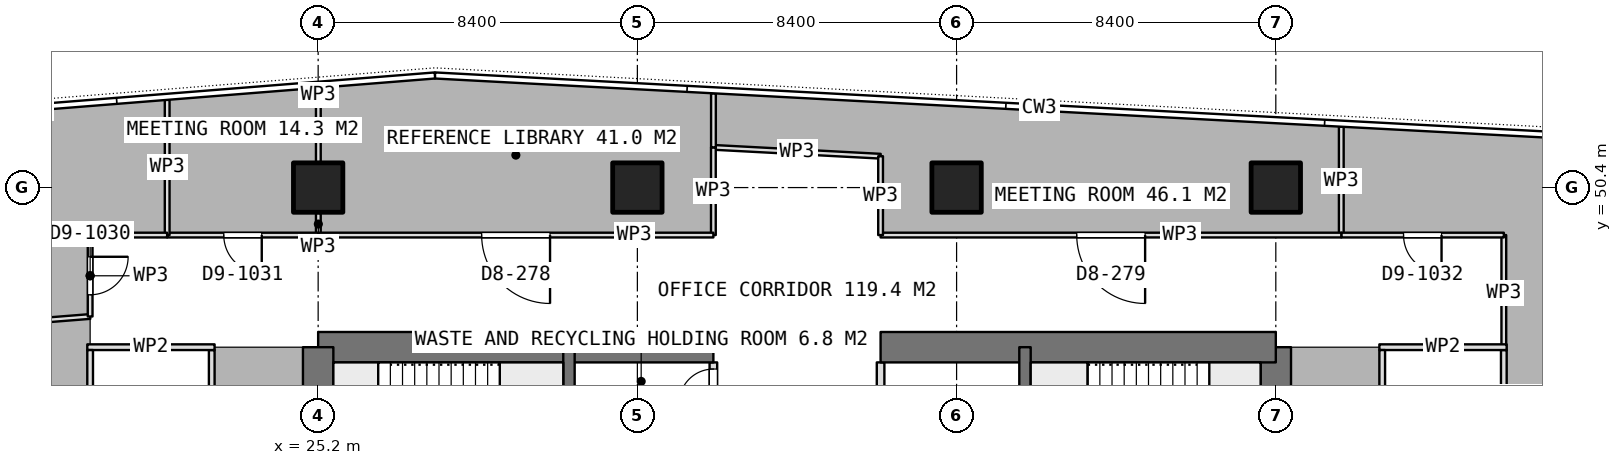
"""IFC4 building model, lengths in metres.
Left out: names, types, materials, properties, quantities, classifications, styles, units other than length and angle.
Written with IfcOpenShell. Run it as: python <this file> out.ifc"""

import sys

from ifc_helpers import new_model, si_unit, direction, frame, frame_2d, origin, origin_2d, place, context, subcontext, project, spatial, rectangle, extrude, element, fill, save


model = new_model("IFC4")
c1 = context("Model", 3, precision=1e-05, world=origin(), true_north=direction((0.0, 1.0)))
c2 = subcontext(c1, "Body", "Model", "MODEL_VIEW")
j1 = project(units=[si_unit("LENGTHUNIT", "METRE"), si_unit("PLANEANGLEUNIT", "RADIAN")], contexts=[c1])
p1 = place(None, origin())
s1 = spatial("IfcSite", under=j1, at=p1, CompositionType="ELEMENT")
p2 = place(p1, origin())
s2 = spatial("IfcBuilding", under=s1, at=p2, CompositionType="ELEMENT")
p3 = place(p2, frame((0.0, 0.0, 276.35)))
s3 = spatial("IfcBuildingStorey", under=s2, at=p3, CompositionType="ELEMENT", Elevation=276.35)
p4 = place(p3, frame((25.2, 46.2, 0.0), z_axis=(0.0, 0.0, 1.0), x_axis=(1.0, 0.0, 0.0)))
e1 = element("IfcWall", 1, at=p4, inside=s3, PredefinedType="SHEAR", context=c2, shape_type="SweptSolid", body=[
    extrude(rectangle(XDim=10.4, YDim=0.8, at=frame_2d((5.2, 0.0))), origin(), (0.0, 0.0, 1.0), 3.75),
])
p5 = place(p3, frame((40.0, 46.2, 0.0), z_axis=(0.0, 0.0, 1.0), x_axis=(1.0, 0.0, 0.0)))
e2 = element("IfcWall", 2, at=p5, inside=s3, PredefinedType="SHEAR", context=c2, shape_type="SweptSolid", body=[
    extrude(rectangle(XDim=10.4, YDim=0.8, at=frame_2d((5.2, 0.0))), origin(), (0.0, 0.0, 1.0), 3.75),
])
p6 = place(p3, frame((25.2, 21.0, 0.0), z_axis=(0.0, 0.0, 1.0), x_axis=(0.0, 1.0, 0.0)))
e3 = element("IfcWall", 3, at=p6, inside=s3, PredefinedType="SHEAR", context=c2, shape_type="SweptSolid", body=[
    extrude(rectangle(XDim=25.2, YDim=0.8, at=frame_2d((12.6, 0.0))), origin(), (0.0, 0.0, 1.0), 3.75),
])
p7 = place(p6, frame((7.8, 0.0, 0.0)))
e4 = element("IfcOpeningElement", 4, at=p7, cuts=e3, PredefinedType="OPENING", context=c2, shape_type="SweptSolid", body=[
    extrude(rectangle(XDim=1.2, YDim=2.1, at=frame_2d((0.6, 1.05))), frame((0.0, 0.41, 0.0), z_axis=(0.0, -1.0, 0.0), x_axis=(1.0, 0.0, 0.0)), (0.0, 0.0, 1.0), 0.82),
])
p8 = place(p6, frame((14.25, 0.0, 0.0)))
e5 = element("IfcOpeningElement", 5, at=p8, cuts=e3, PredefinedType="OPENING", context=c2, shape_type="SweptSolid", body=[
    extrude(rectangle(XDim=0.9, YDim=2.1, at=frame_2d((0.45, 1.05))), frame((0.0, 0.41, 0.0), z_axis=(0.0, -1.0, 0.0), x_axis=(1.0, 0.0, 0.0)), (0.0, 0.0, 1.0), 0.82),
])
p9 = place(p6, frame((16.85, 0.0, 0.0)))
e6 = element("IfcOpeningElement", 6, at=p9, cuts=e3, PredefinedType="OPENING", context=c2, shape_type="SweptSolid", body=[
    extrude(rectangle(XDim=0.9, YDim=2.1, at=frame_2d((0.45, 1.05))), frame((0.0, 0.41, 0.0), z_axis=(0.0, -1.0, 0.0), x_axis=(1.0, 0.0, 0.0)), (0.0, 0.0, 1.0), 0.82),
])
p10 = place(p6, frame((18.95, 0.0, 0.0)))
e7 = element("IfcOpeningElement", 7, at=p10, cuts=e3, PredefinedType="OPENING", context=c2, shape_type="SweptSolid", body=[
    extrude(rectangle(XDim=1.2, YDim=2.1, at=frame_2d((0.6, 1.05))), frame((0.0, 0.41, 0.0), z_axis=(0.0, -1.0, 0.0), x_axis=(1.0, 0.0, 0.0)), (0.0, 0.0, 1.0), 0.82),
])
p11 = place(p3, frame((50.4, 21.0, 0.0), z_axis=(0.0, 0.0, 1.0), x_axis=(0.0, 1.0, 0.0)))
e8 = element("IfcWall", 8, at=p11, inside=s3, PredefinedType="SHEAR", context=c2, shape_type="SweptSolid", body=[
    extrude(rectangle(XDim=25.2, YDim=0.8, at=frame_2d((12.6, 0.0))), origin(), (0.0, 0.0, 1.0), 3.75),
])
p12 = place(p11, frame((16.2, 0.0, 0.0)))
e9 = element("IfcOpeningElement", 9, at=p12, cuts=e8, PredefinedType="OPENING", context=c2, shape_type="SweptSolid", body=[
    extrude(rectangle(XDim=1.2, YDim=2.1, at=frame_2d((0.6, 1.05))), frame((0.0, 0.41, 0.0), z_axis=(0.0, -1.0, 0.0), x_axis=(1.0, 0.0, 0.0)), (0.0, 0.0, 1.0), 0.82),
])
p13 = place(p11, frame((10.05, 0.0, 0.0)))
e10 = element("IfcOpeningElement", 10, at=p13, cuts=e8, PredefinedType="OPENING", context=c2, shape_type="SweptSolid", body=[
    extrude(rectangle(XDim=0.9, YDim=2.1, at=frame_2d((0.45, 1.05))), frame((0.0, 0.41, 0.0), z_axis=(0.0, -1.0, 0.0), x_axis=(1.0, 0.0, 0.0)), (0.0, 0.0, 1.0), 0.82),
])
p14 = place(p11, frame((7.45, 0.0, 0.0)))
e11 = element("IfcOpeningElement", 11, at=p14, cuts=e8, PredefinedType="OPENING", context=c2, shape_type="SweptSolid", body=[
    extrude(rectangle(XDim=0.9, YDim=2.1, at=frame_2d((0.45, 1.05))), frame((0.0, 0.41, 0.0), z_axis=(0.0, -1.0, 0.0), x_axis=(1.0, 0.0, 0.0)), (0.0, 0.0, 1.0), 0.82),
])
p15 = place(p11, frame((0.6, 0.0, 0.0)))
e12 = element("IfcOpeningElement", 12, at=p15, cuts=e8, PredefinedType="OPENING", context=c2, shape_type="SweptSolid", body=[
    extrude(rectangle(XDim=1.2, YDim=2.1, at=frame_2d((0.6, 1.05))), frame((0.0, 0.41, 0.0), z_axis=(0.0, -1.0, 0.0), x_axis=(1.0, 0.0, 0.0)), (0.0, 0.0, 1.0), 0.82),
])
for number, where, z_axis, x_axis in (
    (13, (31.8, 21.0, 0.0), (0.0, 0.0, 1.0), (0.0, 1.0, 0.0)),
    (14, (43.8, 21.0, 0.0), (0.0, 0.0, 1.0), (0.0, 1.0, 0.0)),
):
    element("IfcWall", number, at=place(p3, frame(where, z_axis=z_axis, x_axis=x_axis)), inside=s3, PredefinedType="SHEAR", context=c2, shape_type="SweptSolid", body=[
        extrude(rectangle(XDim=25.2, YDim=0.3, at=frame_2d((12.6, 0.0))), origin(), (0.0, 0.0, 1.0), 3.75),
    ])
for number, where, z_axis, x_axis in (
    (15, (25.2, 50.4, 0.0), (0.0, 0.0, 1.0), (1.0, 0.0, 0.0)),
    (16, (33.6, 50.4, 0.0), (0.0, 0.0, 1.0), (1.0, 0.0, 0.0)),
    (17, (42.0, 50.4, 0.0), (0.0, 0.0, 1.0), (1.0, 0.0, 0.0)),
    (18, (50.4, 50.4, 0.0), (0.0, 0.0, 1.0), (1.0, 0.0, 0.0)),
):
    element("IfcColumn", number, at=place(p3, frame(where, z_axis=z_axis, x_axis=x_axis)), inside=s3, PredefinedType="COLUMN", context=c2, shape_type="SweptSolid", body=[
        extrude(rectangle(XDim=1.3, YDim=1.3, at=origin_2d()), origin(), (0.0, 0.0, 1.0), 3.75),
    ])
p16 = place(p3, frame((40.0, 41.55, 0.0), z_axis=(0.0, 0.0, 1.0), x_axis=(0.0, 1.0, 0.0)))
e19 = element("IfcWall", 19, at=p16, inside=s3, PredefinedType="PARTITIONING", context=c2, shape_type="SweptSolid", body=[
    extrude(rectangle(XDim=4.25, YDim=0.2, at=frame_2d((2.125, 0.0))), origin(), (0.0, 0.0, 1.0), 3.5),
])
p17 = place(p16, frame((1.8, 0.0, 0.0)))
e20 = element("IfcOpeningElement", 20, at=p17, cuts=e19, PredefinedType="OPENING", context=c2, shape_type="SweptSolid", body=[
    extrude(rectangle(XDim=0.9, YDim=2.1, at=frame_2d((0.45, 1.05))), frame((0.0, 0.11, 0.0), z_axis=(0.0, -1.0, 0.0), x_axis=(1.0, 0.0, 0.0)), (0.0, 0.0, 1.0), 0.22),
])
p18 = place(p3, frame((35.6, 41.55, 0.0), z_axis=(0.0, 0.0, 1.0), x_axis=(0.0, 1.0, 0.0)))
e21 = element("IfcWall", 21, at=p18, inside=s3, PredefinedType="PARTITIONING", context=c2, shape_type="SweptSolid", body=[
    extrude(rectangle(XDim=4.25, YDim=0.2, at=frame_2d((2.125, 0.0))), origin(), (0.0, 0.0, 1.0), 3.5),
])
p19 = place(p18, frame((3.175, 0.0, 0.0)))
e22 = element("IfcOpeningElement", 22, at=p19, cuts=e21, PredefinedType="OPENING", context=c2, shape_type="SweptSolid", body=[
    extrude(rectangle(XDim=0.9, YDim=2.1, at=frame_2d((0.45, 1.05))), frame((0.0, 0.11, 0.0), z_axis=(0.0, -1.0, 0.0), x_axis=(1.0, 0.0, 0.0)), (0.0, 0.0, 1.0), 0.22),
])
p20 = place(p18, frame((0.8, 0.0, 0.0)))
e23 = element("IfcOpeningElement", 23, at=p20, cuts=e21, PredefinedType="OPENING", context=c2, shape_type="SweptSolid", body=[
    extrude(rectangle(XDim=1.1, YDim=2.1, at=frame_2d((0.55, 1.05))), frame((0.0, 0.11, 0.0), z_axis=(0.0, -1.0, 0.0), x_axis=(1.0, 0.0, 0.0)), (0.0, 0.0, 1.0), 0.22),
])
p21 = place(p3, frame((53.125, 46.2, 0.0), z_axis=(0.0, 0.0, 1.0), x_axis=(1.0, 0.0, 0.0)))
e24 = element("IfcWall", 24, at=p21, inside=s3, PredefinedType="PARTITIONING", context=c2, shape_type="SweptSolid", body=[
    extrude(rectangle(XDim=3.35, YDim=0.15, at=frame_2d((1.675, 0.0))), origin(), (0.0, 0.0, 1.0), 3.5),
])
p22 = place(p3, frame((53.2, 39.275, 0.0), z_axis=(0.0, 0.0, 1.0), x_axis=(0.0, 1.0, 0.0)))
e25 = element("IfcWall", 25, at=p22, inside=s3, PredefinedType="PARTITIONING", context=c2, shape_type="SweptSolid", body=[
    extrude(rectangle(XDim=6.85, YDim=0.15, at=frame_2d((3.425, 0.0))), origin(), (0.0, 0.0, 1.0), 3.5),
])
p23 = place(p22, frame((2.925, 0.0, 0.0)))
e26 = element("IfcOpeningElement", 26, at=p23, cuts=e25, PredefinedType="OPENING", context=c2, shape_type="SweptSolid", body=[
    extrude(rectangle(XDim=1.0, YDim=2.1, at=frame_2d((0.5, 1.05))), frame((0.0, 0.085, 0.0), z_axis=(0.0, -1.0, 0.0), x_axis=(1.0, 0.0, 0.0)), (0.0, 0.0, 1.0), 0.17),
])
p24 = place(p3, frame((56.4, 39.275, 0.0), z_axis=(0.0, 0.0, 1.0), x_axis=(0.0, 1.0, 0.0)))
e27 = element("IfcWall", 27, at=p24, inside=s3, PredefinedType="PARTITIONING", context=c2, shape_type="SweptSolid", body=[
    extrude(rectangle(XDim=6.85, YDim=0.15, at=frame_2d((3.425, 0.0))), origin(), (0.0, 0.0, 1.0), 3.5),
])
p25 = place(p3, frame((19.125, 46.2, 0.0), z_axis=(0.0, 0.0, 1.0), x_axis=(1.0, 0.0, 0.0)))
e28 = element("IfcWall", 28, at=p25, inside=s3, PredefinedType="PARTITIONING", context=c2, shape_type="SweptSolid", body=[
    extrude(rectangle(XDim=3.35, YDim=0.15, at=frame_2d((1.675, 0.0))), origin(), (0.0, 0.0, 1.0), 3.5),
])
p26 = place(p3, frame((19.2, 39.275, 0.0), z_axis=(0.0, 0.0, 1.0), x_axis=(0.0, 1.0, 0.0)))
e29 = element("IfcWall", 29, at=p26, inside=s3, PredefinedType="PARTITIONING", context=c2, shape_type="SweptSolid", body=[
    extrude(rectangle(XDim=6.85, YDim=0.15, at=frame_2d((3.425, 0.0))), origin(), (0.0, 0.0, 1.0), 3.5),
])
p27 = place(p3, frame((22.4, 39.275, 0.0), z_axis=(0.0, 0.0, 1.0), x_axis=(0.0, 1.0, 0.0)))
e30 = element("IfcWall", 30, at=p27, inside=s3, PredefinedType="PARTITIONING", context=c2, shape_type="SweptSolid", body=[
    extrude(rectangle(XDim=6.85, YDim=0.15, at=frame_2d((3.425, 0.0))), origin(), (0.0, 0.0, 1.0), 3.5),
])
p28 = place(p27, frame((2.925, 0.0, 0.0)))
e31 = element("IfcOpeningElement", 31, at=p28, cuts=e30, PredefinedType="OPENING", context=c2, shape_type="SweptSolid", body=[
    extrude(rectangle(XDim=1.0, YDim=2.1, at=frame_2d((0.5, 1.05))), frame((0.0, 0.085, 0.0), z_axis=(0.0, -1.0, 0.0), x_axis=(1.0, 0.0, 0.0)), (0.0, 0.0, 1.0), 0.17),
])
p29 = place(p3, frame((52.123, 49.15, 0.0), z_axis=(0.0, 0.0, 1.0), x_axis=(0.0, 1.0, 0.0)))
e32 = element("IfcWall", 32, at=p29, inside=s3, PredefinedType="PARTITIONING", context=c2, shape_type="SweptSolid", body=[
    extrude(rectangle(XDim=2.852, YDim=0.125, at=frame_2d((1.426, 0.0))), origin(), (0.0, 0.0, 1.0), 3.5),
])
p30 = place(p3, frame((56.4, 46.125, 0.0), z_axis=(0.0, 0.0, 1.0), x_axis=(0.0, 1.0, 0.0)))
e33 = element("IfcWall", 33, at=p30, inside=s3, PredefinedType="PARTITIONING", context=c2, shape_type="SweptSolid", body=[
    extrude(rectangle(XDim=3.025, YDim=0.125, at=frame_2d((1.512, 0.0))), origin(), (0.0, 0.0, 1.0), 3.5),
])
p31 = place(p3, frame((56.4, 49.15, 0.0), z_axis=(0.0, 0.0, 1.0), x_axis=(-1.0, 0.0, 0.0)))
e34 = element("IfcWall", 34, at=p31, inside=s3, PredefinedType="PARTITIONING", context=c2, shape_type="SweptSolid", body=[
    extrude(rectangle(XDim=4.277, YDim=0.125, at=frame_2d((2.138, 0.0))), origin(), (0.0, 0.0, 1.0), 3.5),
])
p32 = place(p31, frame((1.639, 0.0, 0.0)))
e35 = element("IfcOpeningElement", 35, at=p32, cuts=e34, PredefinedType="OPENING", context=c2, shape_type="SweptSolid", body=[
    extrude(rectangle(XDim=1.0, YDim=2.1, at=frame_2d((0.5, 1.05))), frame((0.0, 0.073, 0.0), z_axis=(0.0, -1.0, 0.0), x_axis=(1.0, 0.0, 0.0)), (0.0, 0.0, 1.0), 0.145),
])
p33 = place(p3, frame((35.602, 51.458, 0.0), z_axis=(0.0, 0.0, 1.0), x_axis=(0.0, 1.0, 0.0)))
e36 = element("IfcWall", 36, at=p33, inside=s3, PredefinedType="PARTITIONING", context=c2, shape_type="SweptSolid", body=[
    extrude(rectangle(XDim=1.422, YDim=0.125, at=frame_2d((0.711, 0.0))), origin(), (0.0, 0.0, 1.0), 3.5),
])
p34 = place(p3, frame((52.123, 49.15, 0.0), z_axis=(0.0, 0.0, 1.0), x_axis=(-1.0, 0.0, 0.0)))
e37 = element("IfcWall", 37, at=p34, inside=s3, PredefinedType="PARTITIONING", context=c2, shape_type="SweptSolid", body=[
    extrude(rectangle(XDim=12.123, YDim=0.125, at=frame_2d((6.062, 0.0))), origin(), (0.0, 0.0, 1.0), 3.5),
])
p35 = place(p34, frame((5.162, 0.0, 0.0)))
e38 = element("IfcOpeningElement", 38, at=p35, cuts=e37, PredefinedType="OPENING", context=c2, shape_type="SweptSolid", body=[
    extrude(rectangle(XDim=1.8, YDim=2.1, at=frame_2d((0.9, 1.05))), frame((0.0, 0.073, 0.0), z_axis=(0.0, -1.0, 0.0), x_axis=(1.0, 0.0, 0.0)), (0.0, 0.0, 1.0), 0.145),
])
p36 = place(p3, frame((40.0, 49.15, 0.0), z_axis=(0.0, 0.0, 1.0), x_axis=(0.0, 1.0, 0.0)))
e39 = element("IfcWall", 39, at=p36, inside=s3, PredefinedType="PARTITIONING", context=c2, shape_type="SweptSolid", body=[
    extrude(rectangle(XDim=2.075, YDim=0.125, at=frame_2d((1.038, 0.0))), origin(), (0.0, 0.0, 1.0), 3.5),
])
p37 = place(p3, frame((40.0, 51.225, 0.0), z_axis=(0.0, 0.0, 1.0), x_axis=(-0.998600625097, 0.052884700585, 0.0)))
e40 = element("IfcWall", 40, at=p37, inside=s3, PredefinedType="PARTITIONING", context=c2, shape_type="SweptSolid", body=[
    extrude(rectangle(XDim=4.404, YDim=0.125, at=frame_2d((2.202, 0.0))), origin(), (0.0, 0.0, 1.0), 3.5),
])
p38 = place(p3, frame((25.205, 53.025, 0.0), z_axis=(0.0, 0.0, 1.0), x_axis=(0.0, -1.0, 0.0)))
e41 = element("IfcWall", 41, at=p38, inside=s3, PredefinedType="PARTITIONING", context=c2, shape_type="SweptSolid", body=[
    extrude(rectangle(XDim=1.955, YDim=0.125, at=frame_2d((0.978, 0.0))), origin(), (0.0, 0.0, 1.0), 3.5),
])
p39 = place(p3, frame((25.205, 49.73, 0.0), z_axis=(0.0, 0.0, 1.0), x_axis=(0.0, -1.0, 0.0)))
e42 = element("IfcWall", 42, at=p39, inside=s3, PredefinedType="PARTITIONING", context=c2, shape_type="SweptSolid", body=[
    extrude(rectangle(XDim=0.58, YDim=0.125, at=frame_2d((0.29, 0.0))), origin(), (0.0, 0.0, 1.0), 3.5),
])
p40 = place(p3, frame((25.205, 49.15, 0.0), z_axis=(0.0, 0.0, 1.0), x_axis=(-1.0, 0.0, 0.0)))
e43 = element("IfcWall", 43, at=p40, inside=s3, PredefinedType="PARTITIONING", context=c2, shape_type="SweptSolid", body=[
    extrude(rectangle(XDim=3.978, YDim=0.125, at=frame_2d((1.989, 0.0))), origin(), (0.0, 0.0, 1.0), 3.5),
])
p41 = place(p40, frame((1.489, 0.0, 0.0)))
e44 = element("IfcOpeningElement", 44, at=p41, cuts=e43, PredefinedType="OPENING", context=c2, shape_type="SweptSolid", body=[
    extrude(rectangle(XDim=1.0, YDim=2.1, at=frame_2d((0.5, 1.05))), frame((0.0, 0.073, 0.0), z_axis=(0.0, -1.0, 0.0), x_axis=(1.0, 0.0, 0.0)), (0.0, 0.0, 1.0), 0.145),
])
p42 = place(p3, frame((21.227, 49.15, 0.0), z_axis=(0.0, 0.0, 1.0), x_axis=(0.0, 1.0, 0.0)))
e45 = element("IfcWall", 45, at=p42, inside=s3, PredefinedType="PARTITIONING", context=c2, shape_type="SweptSolid", body=[
    extrude(rectangle(XDim=3.558, YDim=0.125, at=frame_2d((1.779, 0.0))), origin(), (0.0, 0.0, 1.0), 3.5),
])
p43 = place(p3, frame((19.2, 47.008, 0.0), z_axis=(0.0, 0.0, 1.0), x_axis=(-0.996842300725, -0.079406721921, 0.0)))
e46 = element("IfcWall", 46, at=p43, inside=s3, PredefinedType="PARTITIONING", context=c2, shape_type="SweptSolid", body=[
    extrude(rectangle(XDim=6.02, YDim=0.125, at=frame_2d((3.01, 0.0))), origin(), (0.0, 0.0, 1.0), 3.5),
])
p44 = place(p3, frame((21.226, 49.15, 0.0), z_axis=(0.0, 0.0, 1.0), x_axis=(-1.0, 0.0, 0.0)))
e47 = element("IfcWall", 47, at=p44, inside=s3, PredefinedType="PARTITIONING", context=c2, shape_type="SweptSolid", body=[
    extrude(rectangle(XDim=2.026, YDim=0.125, at=frame_2d((1.013, 0.0))), origin(), (0.0, 0.0, 1.0), 3.5),
])
p45 = place(p3, frame((19.2, 49.15, 0.0), z_axis=(0.0, 0.0, 1.0), x_axis=(0.0, -1.0, 0.0)))
e48 = element("IfcWall", 48, at=p45, inside=s3, PredefinedType="PARTITIONING", context=c2, shape_type="SweptSolid", body=[
    extrude(rectangle(XDim=2.142, YDim=0.125, at=frame_2d((1.071, 0.0))), origin(), (0.0, 0.0, 1.0), 3.5),
])
p46 = place(p45, frame((0.571, 0.0, 0.0)))
e49 = element("IfcOpeningElement", 49, at=p46, cuts=e48, PredefinedType="OPENING", context=c2, shape_type="SweptSolid", body=[
    extrude(rectangle(XDim=1.0, YDim=2.1, at=frame_2d((0.5, 1.05))), frame((0.0, 0.073, 0.0), z_axis=(0.0, -1.0, 0.0), x_axis=(1.0, 0.0, 0.0)), (0.0, 0.0, 1.0), 0.145),
])
p47 = place(p3, frame((35.6, 51.458, 0.0), z_axis=(0.0, 0.0, 1.0), x_axis=(0.0, -1.0, 0.0)))
e50 = element("IfcWall", 50, at=p47, inside=s3, PredefinedType="PARTITIONING", context=c2, shape_type="SweptSolid", body=[
    extrude(rectangle(XDim=2.308, YDim=0.125, at=frame_2d((1.154, 0.0))), origin(), (0.0, 0.0, 1.0), 3.5),
])
p48 = place(p3, frame((35.6, 49.15, 0.0), z_axis=(0.0, 0.0, 1.0), x_axis=(-1.0, 0.0, 0.0)))
e51 = element("IfcWall", 51, at=p48, inside=s3, PredefinedType="PARTITIONING", context=c2, shape_type="SweptSolid", body=[
    extrude(rectangle(XDim=10.395, YDim=0.125, at=frame_2d((5.198, 0.0))), origin(), (0.0, 0.0, 1.0), 3.5),
])
p49 = place(p48, frame((4.298, 0.0, 0.0)))
e52 = element("IfcOpeningElement", 52, at=p49, cuts=e51, PredefinedType="OPENING", context=c2, shape_type="SweptSolid", body=[
    extrude(rectangle(XDim=1.8, YDim=2.1, at=frame_2d((0.9, 1.05))), frame((0.0, 0.073, 0.0), z_axis=(0.0, -1.0, 0.0), x_axis=(1.0, 0.0, 0.0)), (0.0, 0.0, 1.0), 0.145),
])
p50 = place(p19, origin())
e53 = element("IfcDoor", 53, at=p50, inside=s3, OperationType="SINGLE_SWING_LEFT", PredefinedType="DOOR", context=c2, shape_type="SweptSolid", body=[
    extrude(rectangle(XDim=0.9, YDim=2.1, at=frame_2d((0.45, 1.05))), frame((0.0, 0.025, 0.0), z_axis=(0.0, -1.0, 0.0), x_axis=(1.0, 0.0, 0.0)), (0.0, 0.0, 1.0), 0.05),
])
fill(e22, e53)
p51 = place(p32, origin())
e54 = element("IfcDoor", 54, at=p51, inside=s3, OperationType="SINGLE_SWING_LEFT", PredefinedType="DOOR", context=c2, shape_type="SweptSolid", body=[
    extrude(rectangle(XDim=1.0, YDim=2.1, at=frame_2d((0.5, 1.05))), frame((0.0, 0.025, 0.0), z_axis=(0.0, -1.0, 0.0), x_axis=(1.0, 0.0, 0.0)), (0.0, 0.0, 1.0), 0.05),
])
fill(e35, e54)
p52 = place(p35, origin())
e55 = element("IfcDoor", 55, at=p52, inside=s3, OperationType="DOUBLE_DOOR_SINGLE_SWING", PredefinedType="DOOR", context=c2, shape_type="SweptSolid", body=[
    extrude(rectangle(XDim=1.8, YDim=2.1, at=frame_2d((0.9, 1.05))), frame((0.0, 0.025, 0.0), z_axis=(0.0, -1.0, 0.0), x_axis=(1.0, 0.0, 0.0)), (0.0, 0.0, 1.0), 0.05),
])
fill(e38, e55)
p53 = place(p41, origin())
e56 = element("IfcDoor", 56, at=p53, inside=s3, OperationType="SINGLE_SWING_LEFT", PredefinedType="DOOR", context=c2, shape_type="SweptSolid", body=[
    extrude(rectangle(XDim=1.0, YDim=2.1, at=frame_2d((0.5, 1.05))), frame((0.0, 0.025, 0.0), z_axis=(0.0, -1.0, 0.0), x_axis=(1.0, 0.0, 0.0)), (0.0, 0.0, 1.0), 0.05),
])
fill(e44, e56)
p54 = place(p46, origin())
e57 = element("IfcDoor", 57, at=p54, inside=s3, OperationType="SINGLE_SWING_LEFT", PredefinedType="DOOR", context=c2, shape_type="SweptSolid", body=[
    extrude(rectangle(XDim=1.0, YDim=2.1, at=frame_2d((0.5, 1.05))), frame((0.0, 0.025, 0.0), z_axis=(0.0, -1.0, 0.0), x_axis=(1.0, 0.0, 0.0)), (0.0, 0.0, 1.0), 0.05),
])
fill(e49, e57)
p55 = place(p49, origin())
e58 = element("IfcDoor", 58, at=p55, inside=s3, OperationType="DOUBLE_DOOR_SINGLE_SWING", PredefinedType="DOOR", context=c2, shape_type="SweptSolid", body=[
    extrude(rectangle(XDim=1.8, YDim=2.1, at=frame_2d((0.9, 1.05))), frame((0.0, 0.025, 0.0), z_axis=(0.0, -1.0, 0.0), x_axis=(1.0, 0.0, 0.0)), (0.0, 0.0, 1.0), 0.05),
])
fill(e52, e58)
save(model, sys.argv[1])
